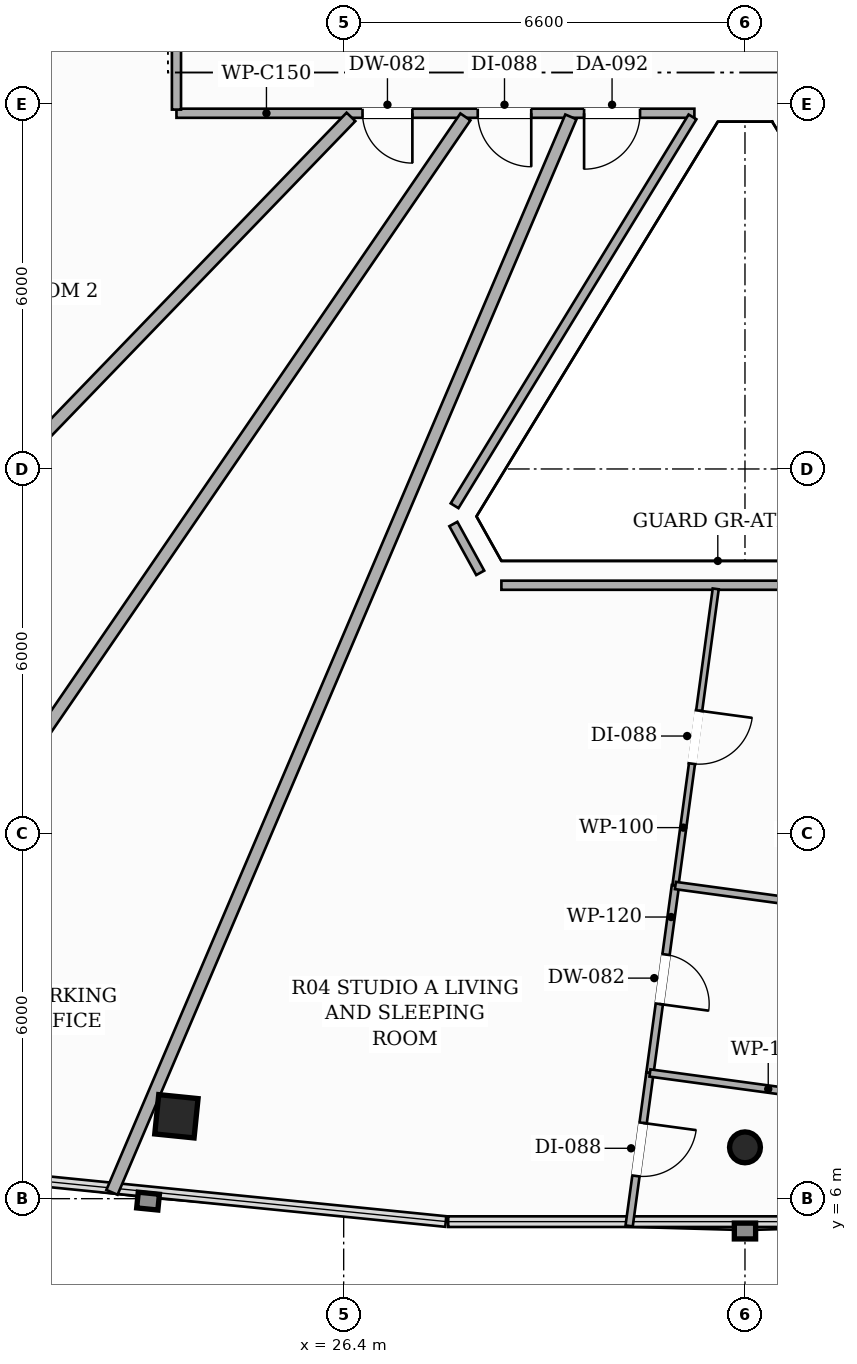
"""IFC4 building model, lengths in metres.
Left out: names, types, materials, properties, quantities, classifications, styles, units other than length and angle.
Written with IfcOpenShell. Run it as: python <this file> out.ifc"""

import sys

from ifc_helpers import new_model, si_unit, direction, frame, frame_2d, origin, origin_2d, place, context, subcontext, project, spatial, rectangle, hollow_rectangle, hollow_circle, extrude, element, fill, save


model = new_model("IFC4")
c1 = context("Model", 3, precision=1e-05, world=origin(), true_north=direction((0.0, 1.0)))
c2 = subcontext(c1, "Body", "Model", "MODEL_VIEW")
j1 = project(units=[si_unit("LENGTHUNIT", "METRE"), si_unit("PLANEANGLEUNIT", "RADIAN")], contexts=[c1])
p1 = place(None, origin())
s1 = spatial("IfcSite", under=j1, at=p1, CompositionType="ELEMENT")
p2 = place(p1, origin())
s2 = spatial("IfcBuilding", under=s1, at=p2, CompositionType="ELEMENT")
p3 = place(p2, frame((0.0, 0.0, 266.75)))
s3 = spatial("IfcBuildingStorey", under=s2, at=p3, CompositionType="ELEMENT", Elevation=266.75)
p4 = place(p3, frame((23.649, 7.355, 0.0), z_axis=(0.0, 0.0, 1.0), x_axis=(-0.994880708829, 0.101056297183, 0.0)))
e1 = element("IfcColumn", 1, at=p4, inside=s3, PredefinedType="COLUMN", context=c2, shape_type="SweptSolid", body=[
    extrude(hollow_rectangle(XDim=0.65, YDim=0.65, WallThickness=0.022, at=origin_2d()), origin(), (0.0, 0.0, 1.0), 3.3),
])
p5 = place(p3, frame((33.0, 6.844, 0.0), z_axis=(0.0, 0.0, 1.0), x_axis=(1.0, 0.0, 0.0)))
e2 = element("IfcColumn", 2, at=p5, inside=s3, PredefinedType="COLUMN", context=c2, shape_type="SweptSolid", body=[
    extrude(hollow_circle(Radius=0.254, WallThickness=0.016, at=origin_2d()), origin(), (0.0, 0.0, 1.0), 3.3),
])
p6 = place(p3, frame((21.988, 32.405, 0.0), z_axis=(0.0, 0.0, 1.0), x_axis=(-0.514361929684, -0.857573206958, 0.0)))
e3 = element("IfcWall", 3, at=p6, inside=s3, PredefinedType="SOLIDWALL", context=c2, shape_type="SweptSolid", body=[
    extrude(rectangle(XDim=9.659, YDim=0.24, at=frame_2d((4.829, 0.0))), origin(), (0.0, 0.0, 1.0), 2.624),
])
p7 = place(p6, frame((7.162, 0.0, 0.0)))
e4 = element("IfcOpeningElement", 4, at=p7, cuts=e3, PredefinedType="OPENING", context=c2, shape_type="SweptSolid", body=[
    extrude(rectangle(XDim=1.8, YDim=2.2, at=frame_2d((0.9, 1.1))), frame((0.0, 0.13, 0.0), z_axis=(0.0, -1.0, 0.0), x_axis=(1.0, 0.0, 0.0)), (0.0, 0.0, 1.0), 0.26),
])
p8 = place(p3, frame((32.168, 23.85, 0.0), z_axis=(0.0, 0.0, 1.0), x_axis=(-1.0, 0.0, 0.0)))
e5 = element("IfcWall", 5, at=p8, inside=s3, PredefinedType="PARTITIONING", context=c2, shape_type="SweptSolid", body=[
    extrude(rectangle(XDim=8.518, YDim=0.15, at=frame_2d((4.259, 0.0))), origin(), (0.0, 0.0, 1.0), 2.565),
])
p9 = place(p8, frame((0.894, 0.0, 0.0)))
e6 = element("IfcOpeningElement", 6, at=p9, cuts=e5, PredefinedType="OPENING", context=c2, shape_type="SweptSolid", body=[
    extrude(rectangle(XDim=0.92, YDim=2.15, at=frame_2d((0.46, 1.075))), frame((0.0, 0.085, 0.0), z_axis=(0.0, -1.0, 0.0), x_axis=(1.0, 0.0, 0.0)), (0.0, 0.0, 1.0), 0.17),
])
p10 = place(p8, frame((2.683, 0.0, 0.0)))
e7 = element("IfcOpeningElement", 7, at=p10, cuts=e5, PredefinedType="OPENING", context=c2, shape_type="SweptSolid", body=[
    extrude(rectangle(XDim=0.88, YDim=2.1, at=frame_2d((0.44, 1.05))), frame((0.0, 0.085, 0.0), z_axis=(0.0, -1.0, 0.0), x_axis=(1.0, 0.0, 0.0)), (0.0, 0.0, 1.0), 0.17),
])
p11 = place(p8, frame((4.638, 0.0, 0.0)))
e8 = element("IfcOpeningElement", 8, at=p11, cuts=e5, PredefinedType="OPENING", context=c2, shape_type="SweptSolid", body=[
    extrude(rectangle(XDim=0.82, YDim=2.1, at=frame_2d((0.41, 1.05))), frame((0.0, 0.085, 0.0), z_axis=(0.0, -1.0, 0.0), x_axis=(1.0, 0.0, 0.0)), (0.0, 0.0, 1.0), 0.17),
])
p12 = place(p3, frame((23.65, 23.91, 0.0), z_axis=(0.0, 0.0, 1.0), x_axis=(0.0, 1.0, 0.0)))
e9 = element("IfcWall", 9, at=p12, inside=s3, PredefinedType="PARTITIONING", context=c2, shape_type="SweptSolid", body=[
    extrude(rectangle(XDim=10.784, YDim=0.15, at=frame_2d((5.392, 0.0))), origin(), (0.0, 0.0, 1.0), 2.492),
])
p13 = place(p12, frame((4.952, 0.0, 0.0)))
e10 = element("IfcOpeningElement", 10, at=p13, cuts=e9, PredefinedType="OPENING", context=c2, shape_type="SweptSolid", body=[
    extrude(rectangle(XDim=0.88, YDim=2.1, at=frame_2d((0.44, 1.05))), frame((0.0, 0.085, 0.0), z_axis=(0.0, -1.0, 0.0), x_axis=(1.0, 0.0, 0.0)), (0.0, 0.0, 1.0), 0.17),
])
p14 = place(p3, frame((37.006, 16.088, 0.0), z_axis=(0.0, 0.0, 1.0), x_axis=(-1.0, 0.0, 0.0)))
e11 = element("IfcWall", 11, at=p14, inside=s3, PredefinedType="PARTITIONING", context=c2, shape_type="SweptSolid", body=[
    extrude(rectangle(XDim=8.012, YDim=0.15, at=frame_2d((4.006, 0.0))), origin(), (0.0, 0.0, 1.0), 2.773),
])
p15 = place(p3, frame((28.646, 16.292, 0.0), z_axis=(0.0, 0.0, 1.0), x_axis=(-0.482133469033, 0.876097778811, 0.0)))
e12 = element("IfcWall", 12, at=p15, inside=s3, PredefinedType="PARTITIONING", context=c2, shape_type="SweptSolid", body=[
    extrude(rectangle(XDim=0.917, YDim=0.15, at=frame_2d((0.458, 0.0))), origin(), (0.0, 0.0, 1.0), 3.06),
])
p16 = place(p3, frame((28.224, 17.395, 0.0), z_axis=(0.0, 0.0, 1.0), x_axis=(0.521913594497, 0.852998358661, 0.0)))
e13 = element("IfcWall", 13, at=p16, inside=s3, PredefinedType="PARTITIONING", context=c2, shape_type="SweptSolid", body=[
    extrude(rectangle(XDim=7.497, YDim=0.15, at=frame_2d((3.749, 0.0))), origin(), (0.0, 0.0, 1.0), 2.773),
])
p17 = place(p3, frame((26.52, 23.79, 0.0), z_axis=(0.0, 0.0, 1.0), x_axis=(-0.694637190704, -0.719360252788, 0.0)))
e14 = element("IfcWall", 14, at=p17, inside=s3, PredefinedType="PARTITIONING", context=c2, shape_type="SweptSolid", body=[
    extrude(rectangle(XDim=21.439, YDim=0.2, at=frame_2d((10.719, 0.0))), origin(), (0.0, 0.0, 1.0), 2.492),
])
p18 = place(p3, frame((22.589, 6.104, 0.0), z_axis=(0.0, 0.0, 1.0), x_axis=(0.392518309842, 0.919744190761, 0.0)))
e15 = element("IfcWall", 15, at=p18, inside=s3, PredefinedType="PARTITIONING", context=c2, shape_type="SweptSolid", body=[
    extrude(rectangle(XDim=19.229, YDim=0.2, at=frame_2d((9.615, 0.0))), origin(), (0.0, 0.0, 1.0), 2.492),
])
p19 = place(p3, frame((16.784, 6.834, 0.0), z_axis=(0.0, 0.0, 1.0), x_axis=(0.565235631435, 0.824929500598, 0.0)))
e16 = element("IfcWall", 16, at=p19, inside=s3, PredefinedType="PARTITIONING", context=c2, shape_type="SweptSolid", body=[
    extrude(rectangle(XDim=20.554, YDim=0.2, at=frame_2d((10.277, 0.0))), origin(), (0.0, 0.0, 1.0), 2.492),
])
p20 = place(p3, frame((31.856, 11.15, 0.0), z_axis=(0.0, 0.0, 1.0), x_axis=(-0.134650977284, -0.990893089246, 0.0)))
e17 = element("IfcWall", 17, at=p20, inside=s3, PredefinedType="PARTITIONING", context=c2, shape_type="SweptSolid", body=[
    extrude(rectangle(XDim=3.111, YDim=0.12, at=frame_2d((1.556, 0.0))), origin(), (0.0, 0.0, 1.0), 3.06),
])
p21 = place(p20, frame((1.146, 0.0, 0.0)))
e18 = element("IfcOpeningElement", 18, at=p21, cuts=e17, PredefinedType="OPENING", context=c2, shape_type="SweptSolid", body=[
    extrude(rectangle(XDim=0.82, YDim=2.1, at=frame_2d((0.41, 1.05))), frame((0.0, 0.07, 0.0), z_axis=(0.0, -1.0, 0.0), x_axis=(1.0, 0.0, 0.0)), (0.0, 0.0, 1.0), 0.14),
])
p22 = place(p3, frame((31.437, 8.067, 0.0), z_axis=(0.0, 0.0, 1.0), x_axis=(-0.134765499074, -0.990877520312, 0.0)))
e19 = element("IfcWall", 19, at=p22, inside=s3, PredefinedType="PARTITIONING", context=c2, shape_type="SweptSolid", body=[
    extrude(rectangle(XDim=2.538, YDim=0.12, at=frame_2d((1.269, 0.0))), origin(), (0.0, 0.0, 1.0), 2.492),
])
p23 = place(p22, frame((0.829, 0.0, 0.0)))
e20 = element("IfcOpeningElement", 20, at=p23, cuts=e19, PredefinedType="OPENING", context=c2, shape_type="SweptSolid", body=[
    extrude(rectangle(XDim=0.88, YDim=2.1, at=frame_2d((0.44, 1.05))), frame((0.0, 0.07, 0.0), z_axis=(0.0, -1.0, 0.0), x_axis=(1.0, 0.0, 0.0)), (0.0, 0.0, 1.0), 0.14),
])
p24 = place(p3, frame((32.519, 16.028, 0.0), z_axis=(0.0, 0.0, 1.0), x_axis=(-0.134690507908, -0.990887716686, 0.0)))
e21 = element("IfcWall", 21, at=p24, inside=s3, PredefinedType="PARTITIONING", context=c2, shape_type="SweptSolid", body=[
    extrude(rectangle(XDim=4.923, YDim=0.1, at=frame_2d((2.461, 0.0))), origin(), (0.0, 0.0, 1.0), 3.06),
])
p25 = place(p24, frame((2.021, 0.0, 0.0)))
e22 = element("IfcOpeningElement", 22, at=p25, cuts=e21, PredefinedType="OPENING", context=c2, shape_type="SweptSolid", body=[
    extrude(rectangle(XDim=0.88, YDim=2.1, at=frame_2d((0.44, 1.05))), frame((0.0, 0.06, 0.0), z_axis=(0.0, -1.0, 0.0), x_axis=(1.0, 0.0, 0.0)), (0.0, 0.0, 1.0), 0.12),
])
p26 = place(p3, frame((35.328, 7.538, 0.0), z_axis=(0.0, 0.0, 1.0), x_axis=(-0.990890227425, 0.134672035678, 0.0)))
e23 = element("IfcWall", 23, at=p26, inside=s3, PredefinedType="PARTITIONING", context=c2, shape_type="SweptSolid", body=[
    extrude(rectangle(XDim=3.927, YDim=0.12, at=frame_2d((1.963, 0.0))), origin(), (0.0, 0.0, 1.0), 2.773),
])
p27 = place(p3, frame((31.856, 11.15, 0.0), z_axis=(0.0, 0.0, 1.0), x_axis=(0.990862518896, -0.13487575263, 0.0)))
e24 = element("IfcWall", 24, at=p27, inside=s3, PredefinedType="PARTITIONING", context=c2, shape_type="SweptSolid", body=[
    extrude(rectangle(XDim=3.166, YDim=0.12, at=frame_2d((1.583, 0.0))), origin(), (0.0, 0.0, 1.0), 2.773),
])
p28 = place(p9, origin())
e25 = element("IfcDoor", 25, at=p28, inside=s3, OperationType="SINGLE_SWING_RIGHT", PredefinedType="DOOR", context=c2, shape_type="SweptSolid", body=[
    extrude(rectangle(XDim=0.92, YDim=2.15, at=frame_2d((0.46, 1.075))), frame((0.0, 0.025, 0.0), z_axis=(0.0, -1.0, 0.0), x_axis=(1.0, 0.0, 0.0)), (0.0, 0.0, 1.0), 0.05),
])
fill(e6, e25)
p29 = place(p21, origin())
e26 = element("IfcDoor", 26, at=p29, inside=s3, OperationType="SINGLE_SWING_RIGHT", PredefinedType="DOOR", context=c2, shape_type="SweptSolid", body=[
    extrude(rectangle(XDim=0.82, YDim=2.1, at=frame_2d((0.41, 1.05))), frame((0.0, 0.025, 0.0), z_axis=(0.0, -1.0, 0.0), x_axis=(1.0, 0.0, 0.0)), (0.0, 0.0, 1.0), 0.05),
])
fill(e18, e26)
p30 = place(p23, origin())
e27 = element("IfcDoor", 27, at=p30, inside=s3, OperationType="SINGLE_SWING_LEFT", PredefinedType="DOOR", context=c2, shape_type="SweptSolid", body=[
    extrude(rectangle(XDim=0.88, YDim=2.1, at=frame_2d((0.44, 1.05))), frame((0.0, 0.025, 0.0), z_axis=(0.0, -1.0, 0.0), x_axis=(1.0, 0.0, 0.0)), (0.0, 0.0, 1.0), 0.05),
])
fill(e20, e27)
p31 = place(p25, origin())
e28 = element("IfcDoor", 28, at=p31, inside=s3, OperationType="SINGLE_SWING_LEFT", PredefinedType="DOOR", context=c2, shape_type="SweptSolid", body=[
    extrude(rectangle(XDim=0.88, YDim=2.1, at=frame_2d((0.44, 1.05))), frame((0.0, 0.025, 0.0), z_axis=(0.0, -1.0, 0.0), x_axis=(1.0, 0.0, 0.0)), (0.0, 0.0, 1.0), 0.05),
])
fill(e22, e28)
p32 = place(p10, origin())
e29 = element("IfcDoor", 29, at=p32, inside=s3, OperationType="SINGLE_SWING_LEFT", PredefinedType="DOOR", context=c2, shape_type="SweptSolid", body=[
    extrude(rectangle(XDim=0.88, YDim=2.1, at=frame_2d((0.44, 1.05))), frame((0.0, 0.025, 0.0), z_axis=(0.0, -1.0, 0.0), x_axis=(1.0, 0.0, 0.0)), (0.0, 0.0, 1.0), 0.05),
])
fill(e7, e29)
p33 = place(p11, origin())
e30 = element("IfcDoor", 30, at=p33, inside=s3, OperationType="SINGLE_SWING_LEFT", PredefinedType="DOOR", context=c2, shape_type="SweptSolid", body=[
    extrude(rectangle(XDim=0.82, YDim=2.1, at=frame_2d((0.41, 1.05))), frame((0.0, 0.025, 0.0), z_axis=(0.0, -1.0, 0.0), x_axis=(1.0, 0.0, 0.0)), (0.0, 0.0, 1.0), 0.05),
])
fill(e8, e30)
save(model, sys.argv[1])
